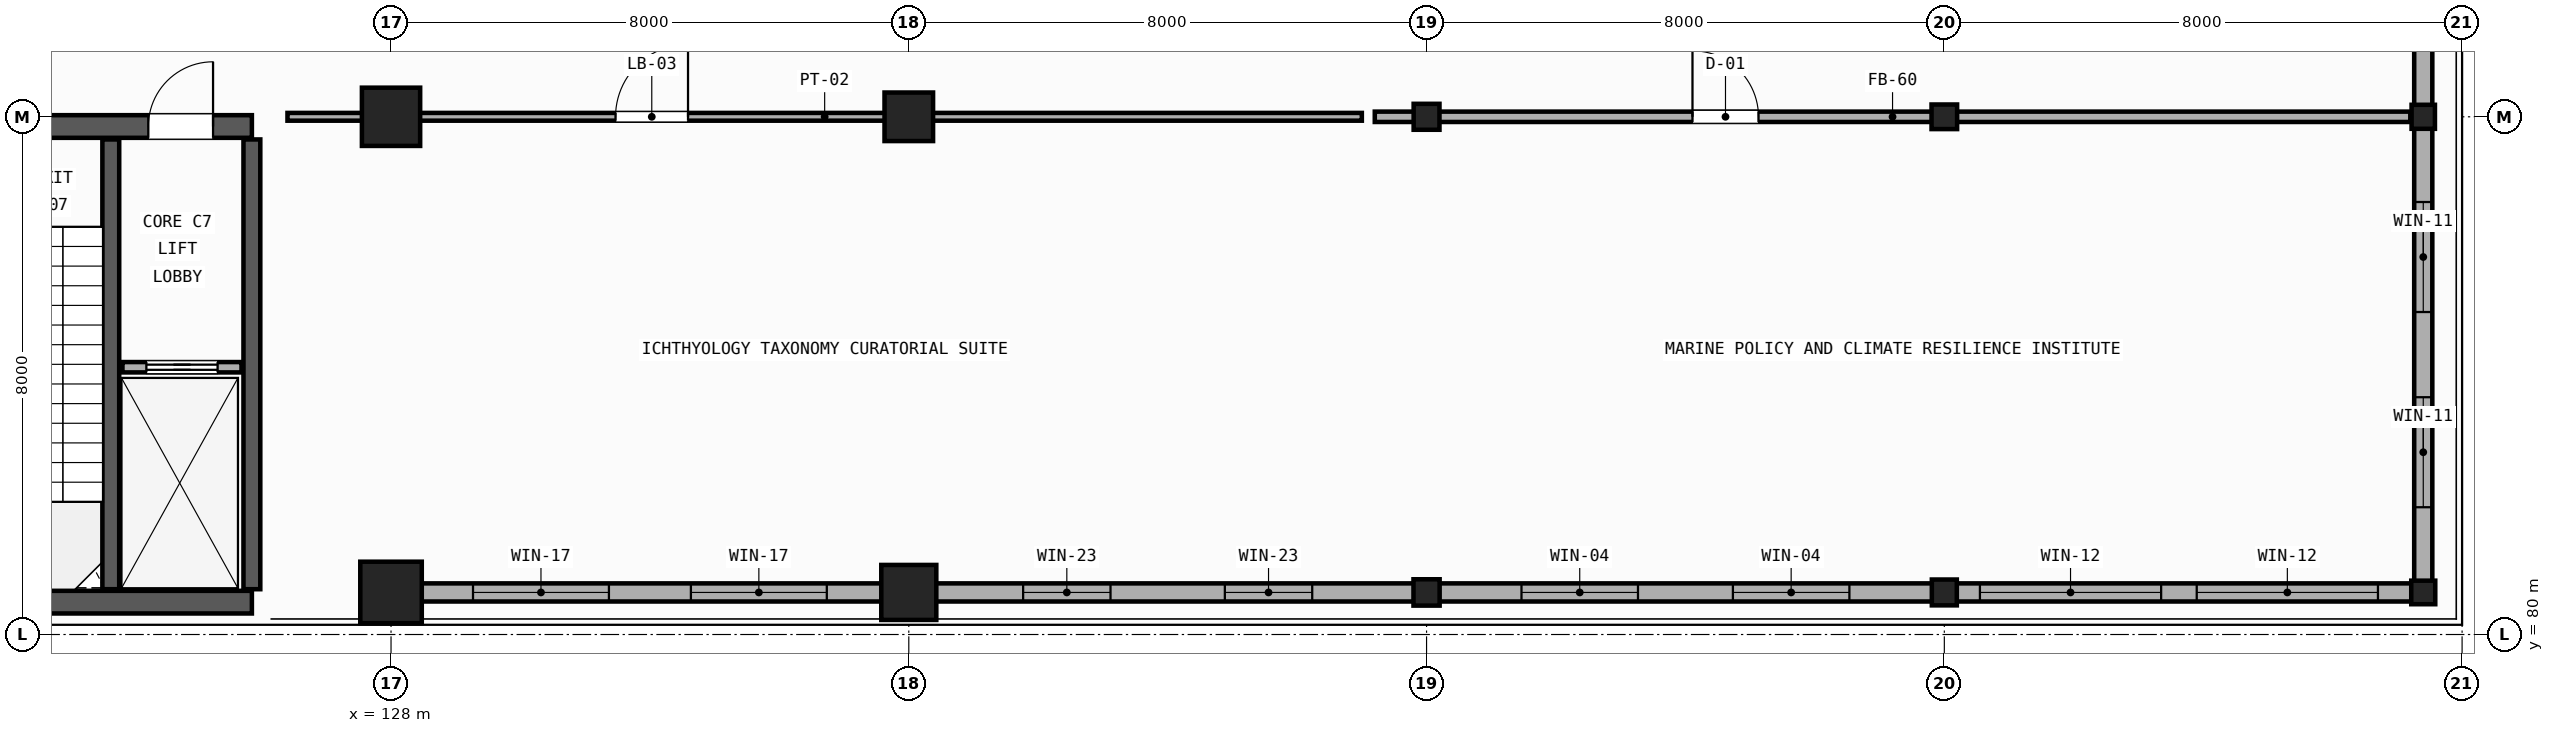
"""IFC4 building model, lengths in metres.
Left out: names, types, materials, properties, quantities, classifications, styles, units other than length and angle.
Written with IfcOpenShell. Run it as: python <this file> out.ifc"""

import sys

from ifc_helpers import new_model, si_unit, direction, frame, frame_2d, origin, origin_2d, place, context, subcontext, project, spatial, rectangle, circle, i_section, extrude, element, fill, save


model = new_model("IFC4")
c1 = context("Model", 3, precision=1e-05, world=origin(), true_north=direction((0.0, 1.0)))
c2 = subcontext(c1, "Body", "Model", "MODEL_VIEW")
j1 = project(units=[si_unit("LENGTHUNIT", "METRE"), si_unit("PLANEANGLEUNIT", "RADIAN")], contexts=[c1])
p1 = place(None, origin())
s1 = spatial("IfcSite", under=j1, at=p1, CompositionType="ELEMENT")
p2 = place(p1, origin())
s2 = spatial("IfcBuilding", under=s1, at=p2, CompositionType="ELEMENT")
p3 = place(p2, frame((0.0, 0.0, 15.0)))
s3 = spatial("IfcBuildingStorey", under=s2, at=p3, CompositionType="ELEMENT", Elevation=15.0)
p4 = place(p3, frame((128.0, 80.65, 0.0), z_axis=(0.0, 0.0, 1.0), x_axis=(1.0, 0.0, 0.0)))
e1 = element("IfcColumn", 1, at=p4, inside=s3, PredefinedType="COLUMN", context=c2, shape_type="SweptSolid", body=[
    extrude(rectangle(XDim=0.95, YDim=0.95, at=origin_2d()), origin(), (0.0, 0.0, 1.0), 4.58),
])
p5 = place(p3, frame((128.0, 88.0, 0.0), z_axis=(0.0, 0.0, 1.0), x_axis=(0.0, 1.0, 0.0)))
e2 = element("IfcColumn", 2, at=p5, inside=s3, PredefinedType="COLUMN", context=c2, shape_type="SweptSolid", body=[
    extrude(rectangle(XDim=0.9, YDim=0.9, at=origin_2d()), origin(), (0.0, 0.0, 1.0), 4.58),
])
p6 = place(p3, frame((136.0, 80.65, 0.0), z_axis=(0.0, 0.0, 1.0), x_axis=(0.0, 1.0, 0.0)))
e3 = element("IfcColumn", 3, at=p6, inside=s3, PredefinedType="COLUMN", context=c2, shape_type="SweptSolid", body=[
    extrude(circle(Radius=0.425, at=origin_2d()), origin(), (0.0, 0.0, 1.0), 4.58),
])
p7 = place(p3, frame((136.0, 88.0, 0.0), z_axis=(0.0, 0.0, 1.0), x_axis=(1.0, 0.0, 0.0)))
e4 = element("IfcColumn", 4, at=p7, inside=s3, PredefinedType="COLUMN", context=c2, shape_type="SweptSolid", body=[
    extrude(circle(Radius=0.375, at=origin_2d()), origin(), (0.0, 0.0, 1.0), 4.58),
])
p8 = place(p3, frame((144.0, 80.65, 0.0), z_axis=(0.0, 0.0, 1.0), x_axis=(1.0, 0.0, 0.0)))
e5 = element("IfcColumn", 5, at=p8, inside=s3, PredefinedType="COLUMN", context=c2, shape_type="SweptSolid", body=[
    extrude(i_section(OverallWidth=0.404, OverallDepth=0.407, WebThickness=0.027, FlangeThickness=0.044, FilletRadius=0.015, at=origin_2d()), origin(), (0.0, 0.0, 1.0), 4.58),
])
p9 = place(p3, frame((144.0, 88.0, 0.0), z_axis=(0.0, 0.0, 1.0), x_axis=(0.0, 1.0, 0.0)))
e6 = element("IfcColumn", 6, at=p9, inside=s3, PredefinedType="COLUMN", context=c2, shape_type="SweptSolid", body=[
    extrude(i_section(OverallWidth=0.401, OverallDepth=0.399, WebThickness=0.025, FlangeThickness=0.04, FilletRadius=0.015, at=origin_2d()), origin(), (0.0, 0.0, 1.0), 4.58),
])
p10 = place(p3, frame((152.0, 80.65, 0.0), z_axis=(0.0, 0.0, 1.0), x_axis=(0.0, 1.0, 0.0)))
e7 = element("IfcColumn", 7, at=p10, inside=s3, PredefinedType="COLUMN", context=c2, shape_type="SweptSolid", body=[
    extrude(i_section(OverallWidth=0.399, OverallDepth=0.386, WebThickness=0.021, FlangeThickness=0.033, FilletRadius=0.015, at=origin_2d()), origin(), (0.0, 0.0, 1.0), 4.8),
])
p11 = place(p3, frame((152.0, 88.0, 0.0), z_axis=(0.0, 0.0, 1.0), x_axis=(1.0, 0.0, 0.0)))
e8 = element("IfcColumn", 8, at=p11, inside=s3, PredefinedType="COLUMN", context=c2, shape_type="SweptSolid", body=[
    extrude(i_section(OverallWidth=0.395, OverallDepth=0.38, WebThickness=0.019, FlangeThickness=0.03, FilletRadius=0.015, at=origin_2d()), origin(), (0.0, 0.0, 1.0), 4.8),
])
p12 = place(p3, frame((159.4, 80.65, 0.0), z_axis=(0.0, 0.0, 1.0), x_axis=(1.0, 0.0, 0.0)))
e9 = element("IfcColumn", 9, at=p12, inside=s3, PredefinedType="COLUMN", context=c2, shape_type="SweptSolid", body=[
    extrude(i_section(OverallWidth=0.371, OverallDepth=0.364, WebThickness=0.013, FlangeThickness=0.022, FilletRadius=0.015, at=origin_2d()), origin(), (0.0, 0.0, 1.0), 4.8),
])
p13 = place(p3, frame((159.4, 88.0, 0.0), z_axis=(0.0, 0.0, 1.0), x_axis=(0.0, 1.0, 0.0)))
e10 = element("IfcColumn", 10, at=p13, inside=s3, PredefinedType="COLUMN", context=c2, shape_type="SweptSolid", body=[
    extrude(i_section(OverallWidth=0.371, OverallDepth=0.361, WebThickness=0.012, FlangeThickness=0.02, FilletRadius=0.015, at=origin_2d()), origin(), (0.0, 0.0, 1.0), 4.8),
])
p14 = place(p3, frame((128.0, 80.65, 0.0), z_axis=(0.0, 0.0, 1.0), x_axis=(1.0, 0.0, 0.0)))
e11 = element("IfcWall", 11, at=p14, inside=s3, PredefinedType="STANDARD", context=c2, shape_type="SweptSolid", body=[
    extrude(rectangle(XDim=8.0, YDim=0.28, at=frame_2d((4.0, 0.0))), origin(), (0.0, 0.0, 1.0), 3.74),
])
p15 = place(p14, frame((1.267, 0.0, 0.85)))
e12 = element("IfcOpeningElement", 12, at=p15, cuts=e11, PredefinedType="OPENING", context=c2, shape_type="SweptSolid", body=[
    extrude(rectangle(XDim=2.1, YDim=2.65, at=frame_2d((1.05, 1.325))), frame((0.0, 0.15, 0.0), z_axis=(0.0, -1.0, 0.0), x_axis=(1.0, 0.0, 0.0)), (0.0, 0.0, 1.0), 0.3),
])
p16 = place(p14, frame((4.633, 0.0, 0.85)))
e13 = element("IfcOpeningElement", 13, at=p16, cuts=e11, PredefinedType="OPENING", context=c2, shape_type="SweptSolid", body=[
    extrude(rectangle(XDim=2.1, YDim=2.65, at=frame_2d((1.05, 1.325))), frame((0.0, 0.15, 0.0), z_axis=(0.0, -1.0, 0.0), x_axis=(1.0, 0.0, 0.0)), (0.0, 0.0, 1.0), 0.3),
])
p17 = place(p3, frame((136.0, 80.65, 0.0), z_axis=(0.0, 0.0, 1.0), x_axis=(1.0, 0.0, 0.0)))
e14 = element("IfcWall", 14, at=p17, inside=s3, PredefinedType="STANDARD", context=c2, shape_type="SweptSolid", body=[
    extrude(rectangle(XDim=8.0, YDim=0.28, at=frame_2d((4.0, 0.0))), origin(), (0.0, 0.0, 1.0), 3.74),
])
p18 = place(p17, frame((1.767, 0.0, 1.0)))
e15 = element("IfcOpeningElement", 15, at=p18, cuts=e14, PredefinedType="OPENING", context=c2, shape_type="SweptSolid", body=[
    extrude(rectangle(XDim=1.35, YDim=1.95, at=frame_2d((0.675, 0.975))), frame((0.0, 0.15, 0.0), z_axis=(0.0, -1.0, 0.0), x_axis=(1.0, 0.0, 0.0)), (0.0, 0.0, 1.0), 0.3),
])
p19 = place(p17, frame((4.883, 0.0, 1.0)))
e16 = element("IfcOpeningElement", 16, at=p19, cuts=e14, PredefinedType="OPENING", context=c2, shape_type="SweptSolid", body=[
    extrude(rectangle(XDim=1.35, YDim=1.95, at=frame_2d((0.675, 0.975))), frame((0.0, 0.15, 0.0), z_axis=(0.0, -1.0, 0.0), x_axis=(1.0, 0.0, 0.0)), (0.0, 0.0, 1.0), 0.3),
])
p20 = place(p3, frame((144.0, 80.65, 0.0), z_axis=(0.0, 0.0, 1.0), x_axis=(1.0, 0.0, 0.0)))
e17 = element("IfcWall", 17, at=p20, inside=s3, PredefinedType="STANDARD", context=c2, shape_type="SweptSolid", body=[
    extrude(rectangle(XDim=8.0, YDim=0.28, at=frame_2d((4.0, 0.0))), origin(), (0.0, 0.0, 1.0), 3.74),
])
p21 = place(p20, frame((1.467, 0.0, 0.9)))
e18 = element("IfcOpeningElement", 18, at=p21, cuts=e17, PredefinedType="OPENING", context=c2, shape_type="SweptSolid", body=[
    extrude(rectangle(XDim=1.8, YDim=2.5, at=frame_2d((0.9, 1.25))), frame((0.0, 0.15, 0.0), z_axis=(0.0, -1.0, 0.0), x_axis=(1.0, 0.0, 0.0)), (0.0, 0.0, 1.0), 0.3),
])
p22 = place(p20, frame((4.733, 0.0, 0.9)))
e19 = element("IfcOpeningElement", 19, at=p22, cuts=e17, PredefinedType="OPENING", context=c2, shape_type="SweptSolid", body=[
    extrude(rectangle(XDim=1.8, YDim=2.5, at=frame_2d((0.9, 1.25))), frame((0.0, 0.15, 0.0), z_axis=(0.0, -1.0, 0.0), x_axis=(1.0, 0.0, 0.0)), (0.0, 0.0, 1.0), 0.3),
])
p23 = place(p3, frame((152.0, 80.65, 0.0), z_axis=(0.0, 0.0, 1.0), x_axis=(1.0, 0.0, 0.0)))
e20 = element("IfcWall", 20, at=p23, inside=s3, PredefinedType="STANDARD", context=c2, shape_type="SweptSolid", body=[
    extrude(rectangle(XDim=7.25, YDim=0.28, at=frame_2d((3.625, 0.0))), origin(), (0.0, 0.0, 1.0), 4.3),
])
p24 = place(p23, frame((0.55, 0.0, 2.2)))
e21 = element("IfcOpeningElement", 21, at=p24, cuts=e20, PredefinedType="OPENING", context=c2, shape_type="SweptSolid", body=[
    extrude(rectangle(XDim=2.8, YDim=1.3, at=frame_2d((1.4, 0.65))), frame((0.0, 0.15, 0.0), z_axis=(0.0, -1.0, 0.0), x_axis=(1.0, 0.0, 0.0)), (0.0, 0.0, 1.0), 0.3),
])
p25 = place(p23, frame((3.9, 0.0, 2.2)))
e22 = element("IfcOpeningElement", 22, at=p25, cuts=e20, PredefinedType="OPENING", context=c2, shape_type="SweptSolid", body=[
    extrude(rectangle(XDim=2.8, YDim=1.3, at=frame_2d((1.4, 0.65))), frame((0.0, 0.15, 0.0), z_axis=(0.0, -1.0, 0.0), x_axis=(1.0, 0.0, 0.0)), (0.0, 0.0, 1.0), 0.3),
])
p26 = place(p3, frame((159.4, 80.65, 0.0), z_axis=(0.0, 0.0, 1.0), x_axis=(0.0, 1.0, 0.0)))
e23 = element("IfcWall", 23, at=p26, inside=s3, PredefinedType="STANDARD", context=c2, shape_type="SweptSolid", body=[
    extrude(rectangle(XDim=7.35, YDim=0.28, at=frame_2d((3.675, 0.0))), origin(), (0.0, 0.0, 1.0), 4.48),
])
p27 = place(p26, frame((1.317, 0.0, 1.05)))
e24 = element("IfcOpeningElement", 24, at=p27, cuts=e23, PredefinedType="OPENING", context=c2, shape_type="SweptSolid", body=[
    extrude(rectangle(XDim=1.7, YDim=1.8, at=frame_2d((0.85, 0.9))), frame((0.0, 0.15, 0.0), z_axis=(0.0, -1.0, 0.0), x_axis=(1.0, 0.0, 0.0)), (0.0, 0.0, 1.0), 0.3),
])
p28 = place(p26, frame((4.333, 0.0, 1.05)))
e25 = element("IfcOpeningElement", 25, at=p28, cuts=e23, PredefinedType="OPENING", context=c2, shape_type="SweptSolid", body=[
    extrude(rectangle(XDim=1.7, YDim=1.8, at=frame_2d((0.85, 0.9))), frame((0.0, 0.15, 0.0), z_axis=(0.0, -1.0, 0.0), x_axis=(1.0, 0.0, 0.0)), (0.0, 0.0, 1.0), 0.3),
])
p29 = place(p3, frame((159.4, 88.0, 0.0), z_axis=(0.0, 0.0, 1.0), x_axis=(0.0, 1.0, 0.0)))
e26 = element("IfcWall", 26, at=p29, inside=s3, PredefinedType="STANDARD", context=c2, shape_type="SweptSolid", body=[
    extrude(rectangle(XDim=5.5, YDim=0.28, at=frame_2d((2.75, 0.0))), origin(), (0.0, 0.0, 1.0), 4.48),
])
p30 = place(p29, frame((1.6, 0.0, 2.25)))
e27 = element("IfcOpeningElement", 27, at=p30, cuts=e26, PredefinedType="OPENING", context=c2, shape_type="SweptSolid", body=[
    extrude(rectangle(XDim=2.3, YDim=1.2, at=frame_2d((1.15, 0.6))), frame((0.0, 0.15, 0.0), z_axis=(0.0, -1.0, 0.0), x_axis=(1.0, 0.0, 0.0)), (0.0, 0.0, 1.0), 0.3),
])
p31 = place(p3, frame((120.0, 87.85, 0.0), z_axis=(0.0, 0.0, 1.0), x_axis=(1.0, 0.0, 0.0)))
e28 = element("IfcWall", 28, at=p31, inside=s3, PredefinedType="SHEAR", context=c2, shape_type="SweptSolid", body=[
    extrude(rectangle(XDim=5.85, YDim=0.35, at=frame_2d((2.925, 0.0))), origin(), (0.0, 0.0, 1.0), 4.57),
])
p32 = place(p31, frame((1.4, 0.0, 0.0)))
e29 = element("IfcOpeningElement", 29, at=p32, cuts=e28, PredefinedType="OPENING", context=c2, shape_type="SweptSolid", body=[
    extrude(rectangle(XDim=1.05, YDim=2.1, at=frame_2d((0.525, 1.05))), frame((0.0, 0.185, 0.0), z_axis=(0.0, -1.0, 0.0), x_axis=(1.0, 0.0, 0.0)), (0.0, 0.0, 1.0), 0.37),
])
p33 = place(p31, frame((4.25, 0.0, 0.0)))
e30 = element("IfcOpeningElement", 30, at=p33, cuts=e28, PredefinedType="OPENING", context=c2, shape_type="SweptSolid", body=[
    extrude(rectangle(XDim=1.0, YDim=2.15, at=frame_2d((0.5, 1.075))), frame((0.0, 0.185, 0.0), z_axis=(0.0, -1.0, 0.0), x_axis=(1.0, 0.0, 0.0)), (0.0, 0.0, 1.0), 0.37),
])
p34 = place(p3, frame((120.0, 80.5, 0.0), z_axis=(0.0, 0.0, 1.0), x_axis=(1.0, 0.0, 0.0)))
e31 = element("IfcWall", 31, at=p34, inside=s3, PredefinedType="SHEAR", context=c2, shape_type="SweptSolid", body=[
    extrude(rectangle(XDim=5.85, YDim=0.35, at=frame_2d((2.925, 0.0))), origin(), (0.0, 0.0, 1.0), 4.57),
])
for number, where, z_axis, x_axis in (
    (32, (125.85, 80.7, 0.0), (0.0, 0.0, 1.0), (0.0, 1.0, 0.0)),
    (33, (123.67, 80.7, 0.0), (0.0, 0.0, 1.0), (0.0, 1.0, 0.0)),
):
    element("IfcWall", number, at=place(p3, frame(where, z_axis=z_axis, x_axis=x_axis)), inside=s3, PredefinedType="SHEAR", context=c2, shape_type="SweptSolid", body=[
        extrude(rectangle(XDim=6.95, YDim=0.26, at=frame_2d((3.475, 0.0))), origin(), (0.0, 0.0, 1.0), 4.57),
    ])
p35 = place(p3, frame((123.85, 84.13, 0.0), z_axis=(0.0, 0.0, 1.0), x_axis=(1.0, 0.0, 0.0)))
e34 = element("IfcWall", 34, at=p35, inside=s3, PredefinedType="PARTITIONING", context=c2, shape_type="SweptSolid", body=[
    extrude(rectangle(XDim=1.84, YDim=0.16, at=frame_2d((0.92, 0.0))), origin(), (0.0, 0.0, 1.0), 3.6),
])
p36 = place(p35, frame((0.37, 0.0, 0.0)))
e35 = element("IfcOpeningElement", 35, at=p36, cuts=e34, PredefinedType="OPENING", context=c2, shape_type="SweptSolid", body=[
    extrude(rectangle(XDim=1.1, YDim=2.15, at=frame_2d((0.55, 1.075))), frame((0.0, 0.09, 0.0), z_axis=(0.0, -1.0, 0.0), x_axis=(1.0, 0.0, 0.0)), (0.0, 0.0, 1.0), 0.18),
])
p37 = place(p3, frame((126.4, 88.0, 0.0), z_axis=(0.0, 0.0, 1.0), x_axis=(1.0, 0.0, 0.0)))
e36 = element("IfcWall", 36, at=p37, inside=s3, PredefinedType="PARTITIONING", context=c2, shape_type="SweptSolid", body=[
    extrude(rectangle(XDim=16.6, YDim=0.12, at=frame_2d((8.3, 0.0))), origin(), (0.0, 0.0, 1.0), 3.778),
])
p38 = place(p37, frame((5.069, 0.0, 0.0)))
e37 = element("IfcOpeningElement", 37, at=p38, cuts=e36, PredefinedType="OPENING", context=c2, shape_type="SweptSolid", body=[
    extrude(rectangle(XDim=1.12, YDim=2.15, at=frame_2d((0.56, 1.075))), frame((0.0, 0.07, 0.0), z_axis=(0.0, -1.0, 0.0), x_axis=(1.0, 0.0, 0.0)), (0.0, 0.0, 1.0), 0.14),
])
p39 = place(p3, frame((143.2, 88.0, 0.0), z_axis=(0.0, 0.0, 1.0), x_axis=(1.0, 0.0, 0.0)))
e38 = element("IfcWall", 38, at=p39, inside=s3, PredefinedType="PARTITIONING", context=c2, shape_type="SweptSolid", body=[
    extrude(rectangle(XDim=16.0, YDim=0.16, at=frame_2d((8.0, 0.0))), origin(), (0.0, 0.0, 1.0), 3.778),
])
p40 = place(p39, frame((4.909, 0.0, 0.0)))
e39 = element("IfcOpeningElement", 39, at=p40, cuts=e38, PredefinedType="OPENING", context=c2, shape_type="SweptSolid", body=[
    extrude(rectangle(XDim=1.02, YDim=2.15, at=frame_2d((0.51, 1.075))), frame((0.0, 0.09, 0.0), z_axis=(0.0, -1.0, 0.0), x_axis=(1.0, 0.0, 0.0)), (0.0, 0.0, 1.0), 0.18),
])
p41 = place(p15, origin())
e40 = element("IfcWindow", 40, at=p41, inside=s3, PartitioningType="SINGLE_PANEL", PredefinedType="WINDOW", context=c2, shape_type="SweptSolid", body=[
    extrude(rectangle(XDim=2.1, YDim=2.65, at=frame_2d((1.05, 1.325))), frame((0.0, 0.03, 0.0), z_axis=(0.0, -1.0, 0.0), x_axis=(1.0, 0.0, 0.0)), (0.0, 0.0, 1.0), 0.06),
])
fill(e12, e40)
p42 = place(p16, origin())
e41 = element("IfcWindow", 41, at=p42, inside=s3, PartitioningType="SINGLE_PANEL", PredefinedType="WINDOW", context=c2, shape_type="SweptSolid", body=[
    extrude(rectangle(XDim=2.1, YDim=2.65, at=frame_2d((1.05, 1.325))), frame((0.0, 0.03, 0.0), z_axis=(0.0, -1.0, 0.0), x_axis=(1.0, 0.0, 0.0)), (0.0, 0.0, 1.0), 0.06),
])
fill(e13, e41)
p43 = place(p18, origin())
e42 = element("IfcWindow", 42, at=p43, inside=s3, PartitioningType="SINGLE_PANEL", PredefinedType="WINDOW", context=c2, shape_type="SweptSolid", body=[
    extrude(rectangle(XDim=1.35, YDim=1.95, at=frame_2d((0.675, 0.975))), frame((0.0, 0.03, 0.0), z_axis=(0.0, -1.0, 0.0), x_axis=(1.0, 0.0, 0.0)), (0.0, 0.0, 1.0), 0.06),
])
fill(e15, e42)
p44 = place(p19, origin())
e43 = element("IfcWindow", 43, at=p44, inside=s3, PartitioningType="SINGLE_PANEL", PredefinedType="WINDOW", context=c2, shape_type="SweptSolid", body=[
    extrude(rectangle(XDim=1.35, YDim=1.95, at=frame_2d((0.675, 0.975))), frame((0.0, 0.03, 0.0), z_axis=(0.0, -1.0, 0.0), x_axis=(1.0, 0.0, 0.0)), (0.0, 0.0, 1.0), 0.06),
])
fill(e16, e43)
p45 = place(p21, origin())
e44 = element("IfcWindow", 44, at=p45, inside=s3, PartitioningType="SINGLE_PANEL", PredefinedType="WINDOW", context=c2, shape_type="SweptSolid", body=[
    extrude(rectangle(XDim=1.8, YDim=2.5, at=frame_2d((0.9, 1.25))), frame((0.0, 0.03, 0.0), z_axis=(0.0, -1.0, 0.0), x_axis=(1.0, 0.0, 0.0)), (0.0, 0.0, 1.0), 0.06),
])
fill(e18, e44)
p46 = place(p22, origin())
e45 = element("IfcWindow", 45, at=p46, inside=s3, PartitioningType="SINGLE_PANEL", PredefinedType="WINDOW", context=c2, shape_type="SweptSolid", body=[
    extrude(rectangle(XDim=1.8, YDim=2.5, at=frame_2d((0.9, 1.25))), frame((0.0, 0.03, 0.0), z_axis=(0.0, -1.0, 0.0), x_axis=(1.0, 0.0, 0.0)), (0.0, 0.0, 1.0), 0.06),
])
fill(e19, e45)
p47 = place(p24, origin())
e46 = element("IfcWindow", 46, at=p47, inside=s3, PartitioningType="SINGLE_PANEL", PredefinedType="WINDOW", context=c2, shape_type="SweptSolid", body=[
    extrude(rectangle(XDim=2.8, YDim=1.3, at=frame_2d((1.4, 0.65))), frame((0.0, 0.03, 0.0), z_axis=(0.0, -1.0, 0.0), x_axis=(1.0, 0.0, 0.0)), (0.0, 0.0, 1.0), 0.06),
])
fill(e21, e46)
p48 = place(p25, origin())
e47 = element("IfcWindow", 47, at=p48, inside=s3, PartitioningType="SINGLE_PANEL", PredefinedType="WINDOW", context=c2, shape_type="SweptSolid", body=[
    extrude(rectangle(XDim=2.8, YDim=1.3, at=frame_2d((1.4, 0.65))), frame((0.0, 0.03, 0.0), z_axis=(0.0, -1.0, 0.0), x_axis=(1.0, 0.0, 0.0)), (0.0, 0.0, 1.0), 0.06),
])
fill(e22, e47)
p49 = place(p27, origin())
e48 = element("IfcWindow", 48, at=p49, inside=s3, PartitioningType="SINGLE_PANEL", PredefinedType="WINDOW", context=c2, shape_type="SweptSolid", body=[
    extrude(rectangle(XDim=1.7, YDim=1.8, at=frame_2d((0.85, 0.9))), frame((0.0, 0.03, 0.0), z_axis=(0.0, -1.0, 0.0), x_axis=(1.0, 0.0, 0.0)), (0.0, 0.0, 1.0), 0.06),
])
fill(e24, e48)
p50 = place(p28, origin())
e49 = element("IfcWindow", 49, at=p50, inside=s3, PartitioningType="SINGLE_PANEL", PredefinedType="WINDOW", context=c2, shape_type="SweptSolid", body=[
    extrude(rectangle(XDim=1.7, YDim=1.8, at=frame_2d((0.85, 0.9))), frame((0.0, 0.03, 0.0), z_axis=(0.0, -1.0, 0.0), x_axis=(1.0, 0.0, 0.0)), (0.0, 0.0, 1.0), 0.06),
])
fill(e25, e49)
p51 = place(p36, origin())
e50 = element("IfcDoor", 50, at=p51, inside=s3, OperationType="SLIDING_TO_LEFT", PredefinedType="DOOR", context=c2, shape_type="SweptSolid", body=[
    extrude(rectangle(XDim=1.1, YDim=2.15, at=frame_2d((0.55, 1.075))), frame((0.0, 0.025, 0.0), z_axis=(0.0, -1.0, 0.0), x_axis=(1.0, 0.0, 0.0)), (0.0, 0.0, 1.0), 0.05),
])
fill(e35, e50)
p52 = place(p33, origin())
e51 = element("IfcDoor", 51, at=p52, inside=s3, OperationType="SINGLE_SWING_RIGHT", PredefinedType="DOOR", context=c2, shape_type="SweptSolid", body=[
    extrude(rectangle(XDim=1.0, YDim=2.15, at=frame_2d((0.5, 1.075))), frame((0.0, 0.025, 0.0), z_axis=(0.0, -1.0, 0.0), x_axis=(1.0, 0.0, 0.0)), (0.0, 0.0, 1.0), 0.05),
])
fill(e30, e51)
p53 = place(p38, origin())
e52 = element("IfcDoor", 52, at=p53, inside=s3, OperationType="SINGLE_SWING_RIGHT", PredefinedType="DOOR", context=c2, shape_type="SweptSolid", body=[
    extrude(rectangle(XDim=1.12, YDim=2.15, at=frame_2d((0.56, 1.075))), frame((0.0, 0.025, 0.0), z_axis=(0.0, -1.0, 0.0), x_axis=(1.0, 0.0, 0.0)), (0.0, 0.0, 1.0), 0.05),
])
fill(e37, e52)
p54 = place(p40, origin())
e53 = element("IfcDoor", 53, at=p54, inside=s3, OperationType="SINGLE_SWING_LEFT", PredefinedType="DOOR", context=c2, shape_type="SweptSolid", body=[
    extrude(rectangle(XDim=1.02, YDim=2.15, at=frame_2d((0.51, 1.075))), frame((0.0, 0.025, 0.0), z_axis=(0.0, -1.0, 0.0), x_axis=(1.0, 0.0, 0.0)), (0.0, 0.0, 1.0), 0.05),
])
fill(e39, e53)
save(model, sys.argv[1])
